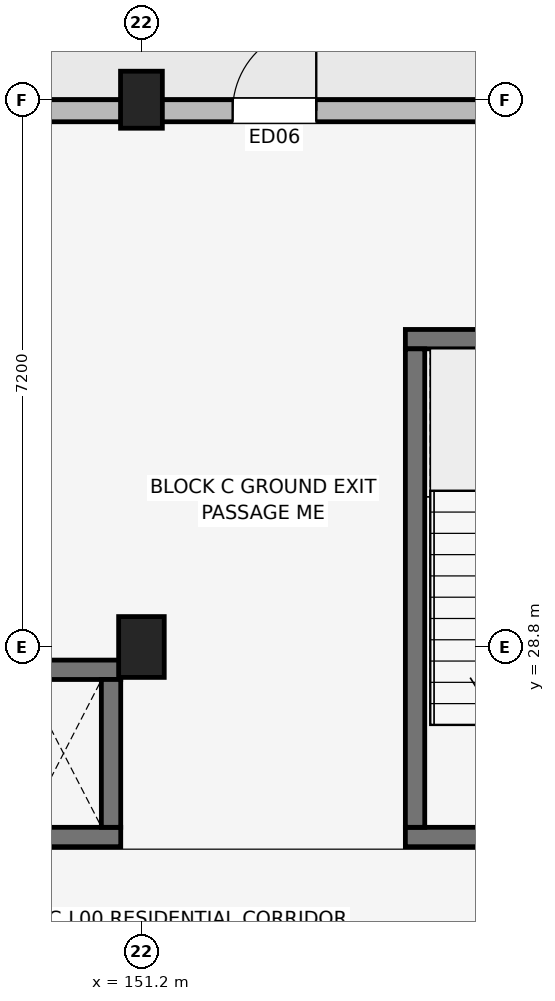
"""IFC4 building model, lengths in metres.
Left out: names, types, materials, properties, quantities, classifications, styles, units other than length and angle.
Written with IfcOpenShell. Run it as: python <this file> out.ifc"""

import sys

from ifc_helpers import new_model, si_unit, direction, frame, frame_2d, origin, origin_2d, place, context, subcontext, project, spatial, rectangle, extrude, element, fill, save


model = new_model("IFC4")
c1 = context("Model", 3, precision=1e-05, world=origin(), true_north=direction((0.0, 1.0)))
c2 = subcontext(c1, "Body", "Model", "MODEL_VIEW")
j1 = project(units=[si_unit("LENGTHUNIT", "METRE"), si_unit("PLANEANGLEUNIT", "RADIAN")], contexts=[c1])
p1 = place(None, origin())
s1 = spatial("IfcSite", under=j1, at=p1, CompositionType="ELEMENT")
p2 = place(p1, origin())
s2 = spatial("IfcBuilding", under=s1, at=p2, CompositionType="ELEMENT")
p3 = place(p2, origin())
s3 = spatial("IfcBuildingStorey", under=s2, at=p3, CompositionType="ELEMENT", Elevation=0.0)
p4 = place(p3, frame((151.2, 28.8, 0.0), z_axis=(0.0, 0.0, 1.0), x_axis=(1.0, 0.0, 0.0)))
e1 = element("IfcColumn", 1, at=p4, inside=s3, PredefinedType="COLUMN", context=c2, shape_type="SweptSolid", body=[
    extrude(rectangle(XDim=0.6, YDim=0.8, at=origin_2d()), origin(), (0.0, 0.0, 1.0), 4.5),
])
p5 = place(p3, frame((151.2, 36.0, 0.0), z_axis=(0.0, 0.0, 1.0), x_axis=(1.0, 0.0, 0.0)))
e2 = element("IfcColumn", 2, at=p5, inside=s3, PredefinedType="COLUMN", context=c2, shape_type="SweptSolid", body=[
    extrude(rectangle(XDim=0.55, YDim=0.75, at=origin_2d()), origin(), (0.0, 0.0, 1.0), 4.5),
])
p6 = place(p3, frame((154.673, 26.3, 0.0), z_axis=(0.0, 0.0, 1.0), x_axis=(1.0, 0.0, 0.0)))
e3 = element("IfcWall", 3, at=p6, inside=s3, PredefinedType="SHEAR", context=c2, shape_type="SweptSolid", body=[
    extrude(rectangle(XDim=3.305, YDim=0.255, at=frame_2d((1.652, 0.0))), origin(), (0.0, 0.0, 1.0), 4.5),
])
p7 = place(p6, frame((1.127, 0.0, 0.0)))
e4 = element("IfcOpeningElement", 4, at=p7, cuts=e3, PredefinedType="OPENING", context=c2, shape_type="SweptSolid", body=[
    extrude(rectangle(XDim=1.05, YDim=2.12, at=frame_2d((0.525, 1.06))), frame((0.0, 0.137, 0.0), z_axis=(0.0, -1.0, 0.0), x_axis=(1.0, 0.0, 0.0)), (0.0, 0.0, 1.0), 0.275),
])
p8 = place(p3, frame((154.673, 32.85, 0.0), z_axis=(0.0, 0.0, 1.0), x_axis=(1.0, 0.0, 0.0)))
e5 = element("IfcWall", 5, at=p8, inside=s3, PredefinedType="SHEAR", context=c2, shape_type="SweptSolid", body=[
    extrude(rectangle(XDim=3.305, YDim=0.255, at=frame_2d((1.652, 0.0))), origin(), (0.0, 0.0, 1.0), 4.5),
])
p9 = place(p3, frame((154.8, 26.427, 0.0), z_axis=(0.0, 0.0, 1.0), x_axis=(0.0, 1.0, 0.0)))
e6 = element("IfcWall", 6, at=p9, inside=s3, PredefinedType="SHEAR", context=c2, shape_type="SweptSolid", body=[
    extrude(rectangle(XDim=6.295, YDim=0.255, at=frame_2d((3.147, 0.0))), origin(), (0.0, 0.0, 1.0), 4.5),
])
for number, where, z_axis, x_axis in (
    (7, (149.123, 26.3, 0.0), (0.0, 0.0, 1.0), (1.0, 0.0, 0.0)),
    (8, (149.123, 28.5, 0.0), (0.0, 0.0, 1.0), (1.0, 0.0, 0.0)),
):
    element("IfcWall", number, at=place(p3, frame(where, z_axis=z_axis, x_axis=x_axis)), inside=s3, PredefinedType="SHEAR", context=c2, shape_type="SweptSolid", body=[
        extrude(rectangle(XDim=1.805, YDim=0.255, at=frame_2d((0.902, 0.0))), origin(), (0.0, 0.0, 1.0), 4.5),
    ])
p10 = place(p3, frame((150.8, 26.427, 0.0), z_axis=(0.0, 0.0, 1.0), x_axis=(0.0, 1.0, 0.0)))
e9 = element("IfcWall", 9, at=p10, inside=s3, PredefinedType="SHEAR", context=c2, shape_type="SweptSolid", body=[
    extrude(rectangle(XDim=1.945, YDim=0.255, at=frame_2d((0.973, 0.0))), origin(), (0.0, 0.0, 1.0), 4.5),
])
p11 = place(p3, frame((162.6, 35.855, 0.0), z_axis=(0.0, 0.0, 1.0), x_axis=(-1.0, 0.0, 0.0)))
e10 = element("IfcWall", 10, at=p11, inside=s3, PredefinedType="SOLIDWALL", context=c2, shape_type="SweptSolid", body=[
    extrude(rectangle(XDim=30.0, YDim=0.29, at=frame_2d((15.0, 0.0))), origin(), (0.0, 0.0, 1.0), 3.38),
])
p12 = place(p11, frame((20.8, 0.0, 0.0), z_axis=(0.0, 0.0, 1.0), x_axis=(-1.0, 0.0, 0.0)))
e11 = element("IfcOpeningElement", 11, at=p12, cuts=e10, PredefinedType="OPENING", context=c2, shape_type="SweptSolid", body=[
    extrude(rectangle(XDim=1.1, YDim=2.15, at=frame_2d((0.55, 1.075))), frame((0.0, 0.155, 0.0), z_axis=(0.0, -1.0, 0.0), x_axis=(1.0, 0.0, 0.0)), (0.0, 0.0, 1.0), 0.31),
])
p13 = place(p11, frame((10.2, 0.0, 0.0), z_axis=(0.0, 0.0, 1.0), x_axis=(-1.0, 0.0, 0.0)))
e12 = element("IfcOpeningElement", 12, at=p13, cuts=e10, PredefinedType="OPENING", context=c2, shape_type="SweptSolid", body=[
    extrude(rectangle(XDim=1.1, YDim=2.15, at=frame_2d((0.55, 1.075))), frame((0.0, 0.155, 0.0), z_axis=(0.0, -1.0, 0.0), x_axis=(1.0, 0.0, 0.0)), (0.0, 0.0, 1.0), 0.31),
])
p14 = place(p11, frame((1.097, 0.0, 0.7)))
e13 = element("IfcOpeningElement", 13, at=p14, cuts=e10, PredefinedType="OPENING", context=c2, shape_type="SweptSolid", body=[
    extrude(rectangle(XDim=1.86, YDim=1.6, at=frame_2d((0.93, 0.8))), frame((0.0, 0.155, 0.0), z_axis=(0.0, -1.0, 0.0), x_axis=(1.0, 0.0, 0.0)), (0.0, 0.0, 1.0), 0.31),
])
p15 = place(p11, frame((26.972, 0.0, 0.7)))
e14 = element("IfcOpeningElement", 14, at=p15, cuts=e10, PredefinedType="OPENING", context=c2, shape_type="SweptSolid", body=[
    extrude(rectangle(XDim=2.0, YDim=1.65, at=frame_2d((1.0, 0.825))), frame((0.0, 0.155, 0.0), z_axis=(0.0, -1.0, 0.0), x_axis=(1.0, 0.0, 0.0)), (0.0, 0.0, 1.0), 0.31),
])
p16 = place(p13, origin())
e15 = element("IfcDoor", 15, at=p16, inside=s3, OperationType="SINGLE_SWING_LEFT", PredefinedType="DOOR", context=c2, shape_type="SweptSolid", body=[
    extrude(rectangle(XDim=1.1, YDim=2.15, at=frame_2d((0.55, 1.075))), frame((0.0, 0.025, 0.0), z_axis=(0.0, -1.0, 0.0), x_axis=(1.0, 0.0, 0.0)), (0.0, 0.0, 1.0), 0.05),
])
fill(e12, e15)
save(model, sys.argv[1])
